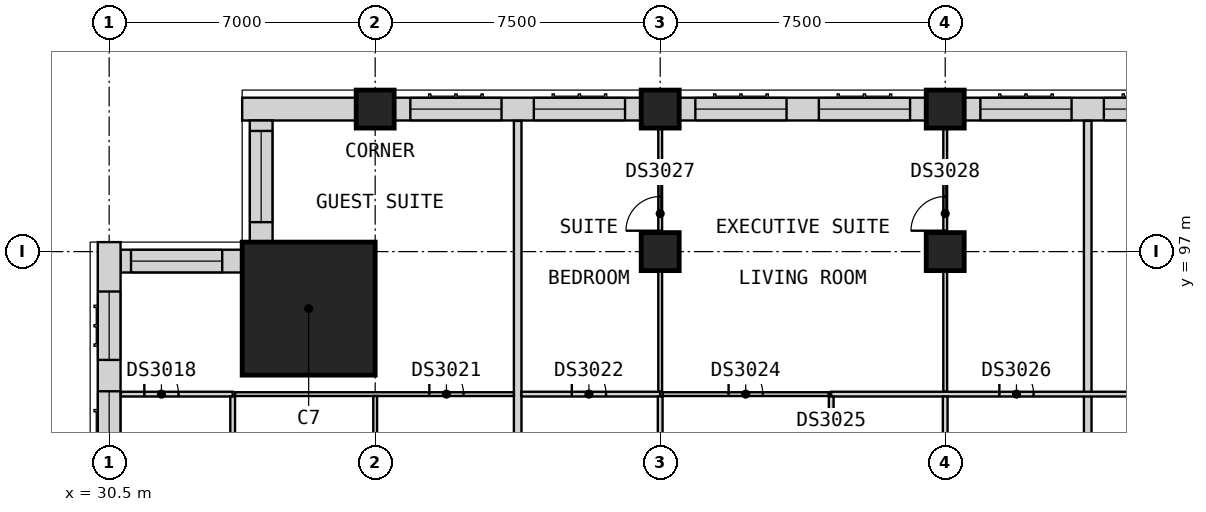
"""IFC4 building model, lengths in metres.
Left out: names, types, materials, properties, quantities, classifications, styles, units other than length and angle.
Written with IfcOpenShell. Run it as: python <this file> out.ifc"""

import sys

from ifc_helpers import new_model, si_unit, direction, frame, frame_2d, origin, origin_2d, place, context, subcontext, project, spatial, rectangle, extrude, element, fill, save


model = new_model("IFC4")
c1 = context("Model", 3, precision=1e-05, world=origin(), true_north=direction((0.0, 1.0)))
c2 = subcontext(c1, "Body", "Model", "MODEL_VIEW")
j1 = project(units=[si_unit("LENGTHUNIT", "METRE"), si_unit("PLANEANGLEUNIT", "RADIAN")], contexts=[c1])
p1 = place(None, origin())
s1 = spatial("IfcSite", under=j1, at=p1, CompositionType="ELEMENT")
p2 = place(p1, origin())
s2 = spatial("IfcBuilding", under=s1, at=p2, CompositionType="ELEMENT")
p3 = place(p2, frame((0.0, 0.0, 137.4)))
s3 = spatial("IfcBuildingStorey", under=s2, at=p3, CompositionType="ELEMENT", Elevation=137.4)
for number, where, z_axis, x_axis in (
    (1, (37.5, 100.75, 0.0), (0.0, 0.0, 1.0), (1.0, 0.0, 0.0)),
    (2, (45.0, 100.75, 0.0), (0.0, 0.0, 1.0), (1.0, 0.0, 0.0)),
    (3, (52.5, 100.75, 0.0), (0.0, 0.0, 1.0), (1.0, 0.0, 0.0)),
    (4, (45.0, 97.0, 0.0), (0.0, 0.0, 1.0), (1.0, 0.0, 0.0)),
    (5, (52.5, 97.0, 0.0), (0.0, 0.0, 1.0), (1.0, 0.0, 0.0)),
):
    element("IfcColumn", number, at=place(p3, frame(where, z_axis=z_axis, x_axis=x_axis)), inside=s3, PredefinedType="COLUMN", context=c2, shape_type="SweptSolid", body=[
        extrude(rectangle(XDim=1.0, YDim=1.0, at=origin_2d()), origin(), (0.0, 0.0, 1.0), 3.6),
    ])
p4 = place(p3, frame((35.75, 95.5, 0.0), z_axis=(0.0, 0.0, 1.0), x_axis=(1.0, 0.0, 0.0)))
e6 = element("IfcColumn", 6, at=p4, inside=s3, PredefinedType="COLUMN", context=c2, shape_type="SweptSolid", body=[
    extrude(rectangle(XDim=3.5, YDim=3.5, at=origin_2d()), origin(), (0.0, 0.0, 1.0), 3.6),
])
p5 = place(p3, frame((59.5, 100.75, 0.0), z_axis=(0.0, 0.0, 1.0), x_axis=(-1.0, 0.0, 0.0)))
e7 = element("IfcWall", 7, at=p5, inside=s3, PredefinedType="SOLIDWALL", context=c2, shape_type="SweptSolid", body=[
    extrude(rectangle(XDim=6.5, YDim=0.6, at=frame_2d((3.25, 0.0))), origin(), (0.0, 0.0, 1.0), 2.85),
])
p6 = place(p5, frame((3.675, 0.0, 0.8)))
e8 = element("IfcOpeningElement", 8, at=p6, cuts=e7, PredefinedType="OPENING", context=c2, shape_type="SweptSolid", body=[
    extrude(rectangle(XDim=2.4, YDim=1.8, at=frame_2d((1.2, 0.9))), frame((0.0, 0.31, 0.0), z_axis=(0.0, -1.0, 0.0), x_axis=(1.0, 0.0, 0.0)), (0.0, 0.0, 1.0), 0.62),
])
p7 = place(p5, frame((0.425, 0.0, 0.8)))
e9 = element("IfcOpeningElement", 9, at=p7, cuts=e7, PredefinedType="OPENING", context=c2, shape_type="SweptSolid", body=[
    extrude(rectangle(XDim=2.4, YDim=1.8, at=frame_2d((1.2, 0.9))), frame((0.0, 0.31, 0.0), z_axis=(0.0, -1.0, 0.0), x_axis=(1.0, 0.0, 0.0)), (0.0, 0.0, 1.0), 0.62),
])
p8 = place(p3, frame((52.0, 100.75, 0.0), z_axis=(0.0, 0.0, 1.0), x_axis=(-1.0, 0.0, 0.0)))
e10 = element("IfcWall", 10, at=p8, inside=s3, PredefinedType="SOLIDWALL", context=c2, shape_type="SweptSolid", body=[
    extrude(rectangle(XDim=6.5, YDim=0.6, at=frame_2d((3.25, 0.0))), origin(), (0.0, 0.0, 1.0), 2.85),
])
p9 = place(p8, frame((3.675, 0.0, 0.8)))
e11 = element("IfcOpeningElement", 11, at=p9, cuts=e10, PredefinedType="OPENING", context=c2, shape_type="SweptSolid", body=[
    extrude(rectangle(XDim=2.4, YDim=1.8, at=frame_2d((1.2, 0.9))), frame((0.0, 0.31, 0.0), z_axis=(0.0, -1.0, 0.0), x_axis=(1.0, 0.0, 0.0)), (0.0, 0.0, 1.0), 0.62),
])
p10 = place(p8, frame((0.425, 0.0, 0.8)))
e12 = element("IfcOpeningElement", 12, at=p10, cuts=e10, PredefinedType="OPENING", context=c2, shape_type="SweptSolid", body=[
    extrude(rectangle(XDim=2.4, YDim=1.8, at=frame_2d((1.2, 0.9))), frame((0.0, 0.31, 0.0), z_axis=(0.0, -1.0, 0.0), x_axis=(1.0, 0.0, 0.0)), (0.0, 0.0, 1.0), 0.62),
])
p11 = place(p3, frame((44.5, 100.75, 0.0), z_axis=(0.0, 0.0, 1.0), x_axis=(-1.0, 0.0, 0.0)))
e13 = element("IfcWall", 13, at=p11, inside=s3, PredefinedType="SOLIDWALL", context=c2, shape_type="SweptSolid", body=[
    extrude(rectangle(XDim=6.5, YDim=0.6, at=frame_2d((3.25, 0.0))), origin(), (0.0, 0.0, 1.0), 2.85),
])
p12 = place(p11, frame((3.675, 0.0, 0.8)))
e14 = element("IfcOpeningElement", 14, at=p12, cuts=e13, PredefinedType="OPENING", context=c2, shape_type="SweptSolid", body=[
    extrude(rectangle(XDim=2.4, YDim=1.8, at=frame_2d((1.2, 0.9))), frame((0.0, 0.31, 0.0), z_axis=(0.0, -1.0, 0.0), x_axis=(1.0, 0.0, 0.0)), (0.0, 0.0, 1.0), 0.62),
])
p13 = place(p11, frame((0.425, 0.0, 0.8)))
e15 = element("IfcOpeningElement", 15, at=p13, cuts=e13, PredefinedType="OPENING", context=c2, shape_type="SweptSolid", body=[
    extrude(rectangle(XDim=2.4, YDim=1.8, at=frame_2d((1.2, 0.9))), frame((0.0, 0.31, 0.0), z_axis=(0.0, -1.0, 0.0), x_axis=(1.0, 0.0, 0.0)), (0.0, 0.0, 1.0), 0.62),
])
p14 = place(p3, frame((37.0, 100.75, 0.0), z_axis=(0.0, 0.0, 1.0), x_axis=(-1.0, 0.0, 0.0)))
e16 = element("IfcWall", 16, at=p14, inside=s3, PredefinedType="SOLIDWALL", context=c2, shape_type="SweptSolid", body=[
    extrude(rectangle(XDim=3.0, YDim=0.6, at=frame_2d((1.5, 0.0))), origin(), (0.0, 0.0, 1.0), 3.35),
])
p15 = place(p3, frame((34.5, 100.45, 0.0), z_axis=(0.0, 0.0, 1.0), x_axis=(0.0, -1.0, 0.0)))
e17 = element("IfcWall", 17, at=p15, inside=s3, PredefinedType="SOLIDWALL", context=c2, shape_type="SweptSolid", body=[
    extrude(rectangle(XDim=3.2, YDim=0.6, at=frame_2d((1.6, 0.0))), origin(), (0.0, 0.0, 1.0), 3.35),
])
p16 = place(p15, frame((0.275, 0.0, 0.8)))
e18 = element("IfcOpeningElement", 18, at=p16, cuts=e17, PredefinedType="OPENING", context=c2, shape_type="SweptSolid", body=[
    extrude(rectangle(XDim=2.4, YDim=1.8, at=frame_2d((1.2, 0.9))), frame((0.0, 0.31, 0.0), z_axis=(0.0, -1.0, 0.0), x_axis=(1.0, 0.0, 0.0)), (0.0, 0.0, 1.0), 0.62),
])
p17 = place(p3, frame((34.0, 96.75, 0.0), z_axis=(0.0, 0.0, 1.0), x_axis=(-1.0, 0.0, 0.0)))
e19 = element("IfcWall", 19, at=p17, inside=s3, PredefinedType="SOLIDWALL", context=c2, shape_type="SweptSolid", body=[
    extrude(rectangle(XDim=3.2, YDim=0.6, at=frame_2d((1.6, 0.0))), origin(), (0.0, 0.0, 1.0), 3.35),
])
p18 = place(p17, frame((0.525, 0.0, 0.8)))
e20 = element("IfcOpeningElement", 20, at=p18, cuts=e19, PredefinedType="OPENING", context=c2, shape_type="SweptSolid", body=[
    extrude(rectangle(XDim=2.4, YDim=1.8, at=frame_2d((1.2, 0.9))), frame((0.0, 0.31, 0.0), z_axis=(0.0, -1.0, 0.0), x_axis=(1.0, 0.0, 0.0)), (0.0, 0.0, 1.0), 0.62),
])
p19 = place(p3, frame((30.5, 97.25, 0.0), z_axis=(0.0, 0.0, 1.0), x_axis=(0.0, -1.0, 0.0)))
e21 = element("IfcWall", 21, at=p19, inside=s3, PredefinedType="SOLIDWALL", context=c2, shape_type="SweptSolid", body=[
    extrude(rectangle(XDim=6.75, YDim=0.6, at=frame_2d((3.375, 0.0))), origin(), (0.0, 0.0, 1.0), 2.85),
])
p20 = place(p19, frame((3.925, 0.0, 0.8)))
e22 = element("IfcOpeningElement", 22, at=p20, cuts=e21, PredefinedType="OPENING", context=c2, shape_type="SweptSolid", body=[
    extrude(rectangle(XDim=2.4, YDim=1.8, at=frame_2d((1.2, 0.9))), frame((0.0, 0.31, 0.0), z_axis=(0.0, -1.0, 0.0), x_axis=(1.0, 0.0, 0.0)), (0.0, 0.0, 1.0), 0.62),
])
p21 = place(p19, frame((1.3, 0.0, 0.8)))
e23 = element("IfcOpeningElement", 23, at=p21, cuts=e21, PredefinedType="OPENING", context=c2, shape_type="SweptSolid", body=[
    extrude(rectangle(XDim=1.8, YDim=1.8, at=frame_2d((0.9, 0.9))), frame((0.0, 0.31, 0.0), z_axis=(0.0, -1.0, 0.0), x_axis=(1.0, 0.0, 0.0)), (0.0, 0.0, 1.0), 0.62),
])
for number, where, z_axis, x_axis in (
    (24, (41.25, 88.725, 0.0), (0.0, 0.0, 1.0), (0.0, 1.0, 0.0)),
    (25, (56.25, 88.725, 0.0), (0.0, 0.0, 1.0), (0.0, 1.0, 0.0)),
):
    element("IfcWall", number, at=place(p3, frame(where, z_axis=z_axis, x_axis=x_axis)), inside=s3, PredefinedType="PARTITIONING", context=c2, shape_type="SweptSolid", body=[
        extrude(rectangle(XDim=11.715, YDim=0.2, at=frame_2d((5.857, 0.0))), origin(), (0.0, 0.0, 1.0), 3.35),
    ])
p22 = place(p3, frame((33.812, 93.25, 0.0), z_axis=(0.0, 0.0, 1.0), x_axis=(1.0, 0.0, 0.0)))
e26 = element("IfcWall", 26, at=p22, inside=s3, PredefinedType="PARTITIONING", context=c2, shape_type="SweptSolid", body=[
    extrude(rectangle(XDim=7.337, YDim=0.1, at=frame_2d((3.669, 0.0))), origin(), (0.0, 0.0, 1.0), 3.35),
])
p23 = place(p22, frame((5.113, 0.0, 0.0)))
e27 = element("IfcOpeningElement", 27, at=p23, cuts=e26, PredefinedType="OPENING", context=c2, shape_type="SweptSolid", body=[
    extrude(rectangle(XDim=0.9, YDim=2.1, at=frame_2d((0.45, 1.05))), frame((0.0, 0.06, 0.0), z_axis=(0.0, -1.0, 0.0), x_axis=(1.0, 0.0, 0.0)), (0.0, 0.0, 1.0), 0.12),
])
p24 = place(p3, frame((45.062, 93.25, 0.0), z_axis=(0.0, 0.0, 1.0), x_axis=(1.0, 0.0, 0.0)))
e28 = element("IfcWall", 28, at=p24, inside=s3, PredefinedType="PARTITIONING", context=c2, shape_type="SweptSolid", body=[
    extrude(rectangle(XDim=4.375, YDim=0.1, at=frame_2d((2.188, 0.0))), origin(), (0.0, 0.0, 1.0), 3.35),
])
p25 = place(p24, frame((1.738, 0.0, 0.0)))
e29 = element("IfcOpeningElement", 29, at=p25, cuts=e28, PredefinedType="OPENING", context=c2, shape_type="SweptSolid", body=[
    extrude(rectangle(XDim=0.9, YDim=2.1, at=frame_2d((0.45, 1.05))), frame((0.0, 0.06, 0.0), z_axis=(0.0, -1.0, 0.0), x_axis=(1.0, 0.0, 0.0)), (0.0, 0.0, 1.0), 0.12),
])
p26 = place(p3, frame((37.5, 88.725, 0.0), z_axis=(0.0, 0.0, 1.0), x_axis=(0.0, 1.0, 0.0)))
e30 = element("IfcWall", 30, at=p26, inside=s3, PredefinedType="PARTITIONING", context=c2, shape_type="SweptSolid", body=[
    extrude(rectangle(XDim=4.475, YDim=0.1, at=frame_2d((2.237, 0.0))), origin(), (0.0, 0.0, 1.0), 3.35),
])
p27 = place(p26, frame((1.825, 0.0, 0.0)))
e31 = element("IfcOpeningElement", 31, at=p27, cuts=e30, PredefinedType="OPENING", context=c2, shape_type="SweptSolid", body=[
    extrude(rectangle(XDim=0.9, YDim=2.1, at=frame_2d((0.45, 1.05))), frame((0.0, 0.06, 0.0), z_axis=(0.0, -1.0, 0.0), x_axis=(1.0, 0.0, 0.0)), (0.0, 0.0, 1.0), 0.12),
])
p28 = place(p3, frame((45.0, 93.312, 0.0), z_axis=(0.0, 0.0, 1.0), x_axis=(0.0, 1.0, 0.0)))
e32 = element("IfcWall", 32, at=p28, inside=s3, PredefinedType="PARTITIONING", context=c2, shape_type="SweptSolid", body=[
    extrude(rectangle(XDim=7.938, YDim=0.1, at=frame_2d((3.969, 0.0))), origin(), (0.0, 0.0, 1.0), 3.35),
])
p29 = place(p28, frame((4.238, 0.0, 0.0)))
e33 = element("IfcOpeningElement", 33, at=p29, cuts=e32, PredefinedType="OPENING", context=c2, shape_type="SweptSolid", body=[
    extrude(rectangle(XDim=0.9, YDim=2.1, at=frame_2d((0.45, 1.05))), frame((0.0, 0.06, 0.0), z_axis=(0.0, -1.0, 0.0), x_axis=(1.0, 0.0, 0.0)), (0.0, 0.0, 1.0), 0.12),
])
p30 = place(p3, frame((52.5, 93.312, 0.0), z_axis=(0.0, 0.0, 1.0), x_axis=(0.0, 1.0, 0.0)))
e34 = element("IfcWall", 34, at=p30, inside=s3, PredefinedType="PARTITIONING", context=c2, shape_type="SweptSolid", body=[
    extrude(rectangle(XDim=7.938, YDim=0.1, at=frame_2d((3.969, 0.0))), origin(), (0.0, 0.0, 1.0), 3.35),
])
p31 = place(p30, frame((4.238, 0.0, 0.0)))
e35 = element("IfcOpeningElement", 35, at=p31, cuts=e34, PredefinedType="OPENING", context=c2, shape_type="SweptSolid", body=[
    extrude(rectangle(XDim=0.9, YDim=2.1, at=frame_2d((0.45, 1.05))), frame((0.0, 0.06, 0.0), z_axis=(0.0, -1.0, 0.0), x_axis=(1.0, 0.0, 0.0)), (0.0, 0.0, 1.0), 0.12),
])
p32 = place(p3, frame((30.81, 93.25, 0.0), z_axis=(0.0, 0.0, 1.0), x_axis=(1.0, 0.0, 0.0)))
e36 = element("IfcWall", 36, at=p32, inside=s3, PredefinedType="PARTITIONING", context=c2, shape_type="SweptSolid", body=[
    extrude(rectangle(XDim=2.94, YDim=0.125, at=frame_2d((1.47, 0.0))), origin(), (0.0, 0.0, 1.0), 3.35),
])
p33 = place(p32, frame((0.615, 0.0, 0.0)))
e37 = element("IfcOpeningElement", 37, at=p33, cuts=e36, PredefinedType="OPENING", context=c2, shape_type="SweptSolid", body=[
    extrude(rectangle(XDim=0.9, YDim=2.1, at=frame_2d((0.45, 1.05))), frame((0.0, 0.073, 0.0), z_axis=(0.0, -1.0, 0.0), x_axis=(1.0, 0.0, 0.0)), (0.0, 0.0, 1.0), 0.145),
])
p34 = place(p3, frame((41.35, 93.25, 0.0), z_axis=(0.0, 0.0, 1.0), x_axis=(1.0, 0.0, 0.0)))
e38 = element("IfcWall", 38, at=p34, inside=s3, PredefinedType="PARTITIONING", context=c2, shape_type="SweptSolid", body=[
    extrude(rectangle(XDim=3.65, YDim=0.125, at=frame_2d((1.825, 0.0))), origin(), (0.0, 0.0, 1.0), 3.35),
])
p35 = place(p34, frame((1.325, 0.0, 0.0)))
e39 = element("IfcOpeningElement", 39, at=p35, cuts=e38, PredefinedType="OPENING", context=c2, shape_type="SweptSolid", body=[
    extrude(rectangle(XDim=0.9, YDim=2.1, at=frame_2d((0.45, 1.05))), frame((0.0, 0.073, 0.0), z_axis=(0.0, -1.0, 0.0), x_axis=(1.0, 0.0, 0.0)), (0.0, 0.0, 1.0), 0.145),
])
p36 = place(p3, frame((49.5, 93.25, 0.0), z_axis=(0.0, 0.0, 1.0), x_axis=(1.0, 0.0, 0.0)))
e40 = element("IfcWall", 40, at=p36, inside=s3, PredefinedType="PARTITIONING", context=c2, shape_type="SweptSolid", body=[
    extrude(rectangle(XDim=11.25, YDim=0.125, at=frame_2d((5.625, 0.0))), origin(), (0.0, 0.0, 1.0), 3.35),
])
p37 = place(p36, frame((4.425, 0.0, 0.0)))
e41 = element("IfcOpeningElement", 41, at=p37, cuts=e40, PredefinedType="OPENING", context=c2, shape_type="SweptSolid", body=[
    extrude(rectangle(XDim=0.9, YDim=2.1, at=frame_2d((0.45, 1.05))), frame((0.0, 0.073, 0.0), z_axis=(0.0, -1.0, 0.0), x_axis=(1.0, 0.0, 0.0)), (0.0, 0.0, 1.0), 0.145),
])
p38 = place(p36, frame((8.55, 0.0, 0.0)))
e42 = element("IfcOpeningElement", 42, at=p38, cuts=e40, PredefinedType="OPENING", context=c2, shape_type="SweptSolid", body=[
    extrude(rectangle(XDim=0.9, YDim=2.1, at=frame_2d((0.45, 1.05))), frame((0.0, 0.073, 0.0), z_axis=(0.0, -1.0, 0.0), x_axis=(1.0, 0.0, 0.0)), (0.0, 0.0, 1.0), 0.145),
])
for number, where, z_axis, x_axis in (
    (43, (33.75, 88.725, 0.0), (0.0, 0.0, 1.0), (0.0, 1.0, 0.0)),
    (44, (45.0, 88.725, 0.0), (0.0, 0.0, 1.0), (0.0, 1.0, 0.0)),
):
    element("IfcWall", number, at=place(p3, frame(where, z_axis=z_axis, x_axis=x_axis)), inside=s3, PredefinedType="PARTITIONING", context=c2, shape_type="SweptSolid", body=[
        extrude(rectangle(XDim=4.462, YDim=0.125, at=frame_2d((2.231, 0.0))), origin(), (0.0, 0.0, 1.0), 3.35),
    ])
p39 = place(p3, frame((49.5, 88.725, 0.0), z_axis=(0.0, 0.0, 1.0), x_axis=(0.0, 1.0, 0.0)))
e45 = element("IfcWall", 45, at=p39, inside=s3, PredefinedType="PARTITIONING", context=c2, shape_type="SweptSolid", body=[
    extrude(rectangle(XDim=4.462, YDim=0.125, at=frame_2d((2.231, 0.0))), origin(), (0.0, 0.0, 1.0), 3.35),
])
p40 = place(p39, frame((1.775, 0.0, 0.0)))
e46 = element("IfcOpeningElement", 46, at=p40, cuts=e45, PredefinedType="OPENING", context=c2, shape_type="SweptSolid", body=[
    extrude(rectangle(XDim=0.9, YDim=2.1, at=frame_2d((0.45, 1.05))), frame((0.0, 0.073, 0.0), z_axis=(0.0, -1.0, 0.0), x_axis=(1.0, 0.0, 0.0)), (0.0, 0.0, 1.0), 0.145),
])
p41 = place(p3, frame((52.5, 88.725, 0.0), z_axis=(0.0, 0.0, 1.0), x_axis=(0.0, 1.0, 0.0)))
e47 = element("IfcWall", 47, at=p41, inside=s3, PredefinedType="PARTITIONING", context=c2, shape_type="SweptSolid", body=[
    extrude(rectangle(XDim=4.462, YDim=0.125, at=frame_2d((2.231, 0.0))), origin(), (0.0, 0.0, 1.0), 3.35),
])
p42 = place(p6, origin())
e48 = element("IfcWindow", 48, at=p42, inside=s3, PartitioningType="SINGLE_PANEL", PredefinedType="WINDOW", context=c2, shape_type="SweptSolid", body=[
    extrude(rectangle(XDim=2.4, YDim=1.8, at=frame_2d((1.2, 0.9))), frame((0.0, -0.07, 0.0), z_axis=(0.0, -1.0, 0.0), x_axis=(1.0, 0.0, 0.0)), (0.0, 0.0, 1.0), 0.06),
])
fill(e8, e48)
p43 = place(p7, origin())
e49 = element("IfcWindow", 49, at=p43, inside=s3, PartitioningType="SINGLE_PANEL", PredefinedType="WINDOW", context=c2, shape_type="SweptSolid", body=[
    extrude(rectangle(XDim=2.4, YDim=1.8, at=frame_2d((1.2, 0.9))), frame((0.0, -0.07, 0.0), z_axis=(0.0, -1.0, 0.0), x_axis=(1.0, 0.0, 0.0)), (0.0, 0.0, 1.0), 0.06),
])
fill(e9, e49)
p44 = place(p9, origin())
e50 = element("IfcWindow", 50, at=p44, inside=s3, PartitioningType="SINGLE_PANEL", PredefinedType="WINDOW", context=c2, shape_type="SweptSolid", body=[
    extrude(rectangle(XDim=2.4, YDim=1.8, at=frame_2d((1.2, 0.9))), frame((0.0, -0.07, 0.0), z_axis=(0.0, -1.0, 0.0), x_axis=(1.0, 0.0, 0.0)), (0.0, 0.0, 1.0), 0.06),
])
fill(e11, e50)
p45 = place(p10, origin())
e51 = element("IfcWindow", 51, at=p45, inside=s3, PartitioningType="SINGLE_PANEL", PredefinedType="WINDOW", context=c2, shape_type="SweptSolid", body=[
    extrude(rectangle(XDim=2.4, YDim=1.8, at=frame_2d((1.2, 0.9))), frame((0.0, -0.07, 0.0), z_axis=(0.0, -1.0, 0.0), x_axis=(1.0, 0.0, 0.0)), (0.0, 0.0, 1.0), 0.06),
])
fill(e12, e51)
p46 = place(p12, origin())
e52 = element("IfcWindow", 52, at=p46, inside=s3, PartitioningType="SINGLE_PANEL", PredefinedType="WINDOW", context=c2, shape_type="SweptSolid", body=[
    extrude(rectangle(XDim=2.4, YDim=1.8, at=frame_2d((1.2, 0.9))), frame((0.0, -0.07, 0.0), z_axis=(0.0, -1.0, 0.0), x_axis=(1.0, 0.0, 0.0)), (0.0, 0.0, 1.0), 0.06),
])
fill(e14, e52)
p47 = place(p13, origin())
e53 = element("IfcWindow", 53, at=p47, inside=s3, PartitioningType="SINGLE_PANEL", PredefinedType="WINDOW", context=c2, shape_type="SweptSolid", body=[
    extrude(rectangle(XDim=2.4, YDim=1.8, at=frame_2d((1.2, 0.9))), frame((0.0, -0.07, 0.0), z_axis=(0.0, -1.0, 0.0), x_axis=(1.0, 0.0, 0.0)), (0.0, 0.0, 1.0), 0.06),
])
fill(e15, e53)
p48 = place(p16, origin())
e54 = element("IfcWindow", 54, at=p48, inside=s3, PartitioningType="SINGLE_PANEL", PredefinedType="WINDOW", context=c2, shape_type="SweptSolid", body=[
    extrude(rectangle(XDim=2.4, YDim=1.8, at=frame_2d((1.2, 0.9))), frame((0.0, -0.07, 0.0), z_axis=(0.0, -1.0, 0.0), x_axis=(1.0, 0.0, 0.0)), (0.0, 0.0, 1.0), 0.06),
])
fill(e18, e54)
p49 = place(p18, origin())
e55 = element("IfcWindow", 55, at=p49, inside=s3, PartitioningType="SINGLE_PANEL", PredefinedType="WINDOW", context=c2, shape_type="SweptSolid", body=[
    extrude(rectangle(XDim=2.4, YDim=1.8, at=frame_2d((1.2, 0.9))), frame((0.0, -0.07, 0.0), z_axis=(0.0, -1.0, 0.0), x_axis=(1.0, 0.0, 0.0)), (0.0, 0.0, 1.0), 0.06),
])
fill(e20, e55)
p50 = place(p20, origin())
e56 = element("IfcWindow", 56, at=p50, inside=s3, PartitioningType="SINGLE_PANEL", PredefinedType="WINDOW", context=c2, shape_type="SweptSolid", body=[
    extrude(rectangle(XDim=2.4, YDim=1.8, at=frame_2d((1.2, 0.9))), frame((0.0, -0.07, 0.0), z_axis=(0.0, -1.0, 0.0), x_axis=(1.0, 0.0, 0.0)), (0.0, 0.0, 1.0), 0.06),
])
fill(e22, e56)
p51 = place(p21, origin())
e57 = element("IfcWindow", 57, at=p51, inside=s3, PartitioningType="SINGLE_PANEL", PredefinedType="WINDOW", context=c2, shape_type="SweptSolid", body=[
    extrude(rectangle(XDim=1.8, YDim=1.8, at=frame_2d((0.9, 0.9))), frame((0.0, -0.07, 0.0), z_axis=(0.0, -1.0, 0.0), x_axis=(1.0, 0.0, 0.0)), (0.0, 0.0, 1.0), 0.06),
])
fill(e23, e57)
p52 = place(p33, origin())
e58 = element("IfcDoor", 58, at=p52, inside=s3, OperationType="SINGLE_SWING_RIGHT", PredefinedType="DOOR", context=c2, shape_type="SweptSolid", body=[
    extrude(rectangle(XDim=0.9, YDim=2.1, at=frame_2d((0.45, 1.05))), frame((0.0, 0.025, 0.0), z_axis=(0.0, -1.0, 0.0), x_axis=(1.0, 0.0, 0.0)), (0.0, 0.0, 1.0), 0.05),
])
fill(e37, e58)
p53 = place(p23, origin())
e59 = element("IfcDoor", 59, at=p53, inside=s3, OperationType="SINGLE_SWING_RIGHT", PredefinedType="DOOR", context=c2, shape_type="SweptSolid", body=[
    extrude(rectangle(XDim=0.9, YDim=2.1, at=frame_2d((0.45, 1.05))), frame((0.0, 0.025, 0.0), z_axis=(0.0, -1.0, 0.0), x_axis=(1.0, 0.0, 0.0)), (0.0, 0.0, 1.0), 0.05),
])
fill(e27, e59)
p54 = place(p35, origin())
e60 = element("IfcDoor", 60, at=p54, inside=s3, OperationType="SINGLE_SWING_RIGHT", PredefinedType="DOOR", context=c2, shape_type="SweptSolid", body=[
    extrude(rectangle(XDim=0.9, YDim=2.1, at=frame_2d((0.45, 1.05))), frame((0.0, 0.025, 0.0), z_axis=(0.0, -1.0, 0.0), x_axis=(1.0, 0.0, 0.0)), (0.0, 0.0, 1.0), 0.05),
])
fill(e39, e60)
p55 = place(p25, origin())
e61 = element("IfcDoor", 61, at=p55, inside=s3, OperationType="SINGLE_SWING_RIGHT", PredefinedType="DOOR", context=c2, shape_type="SweptSolid", body=[
    extrude(rectangle(XDim=0.9, YDim=2.1, at=frame_2d((0.45, 1.05))), frame((0.0, 0.025, 0.0), z_axis=(0.0, -1.0, 0.0), x_axis=(1.0, 0.0, 0.0)), (0.0, 0.0, 1.0), 0.05),
])
fill(e29, e61)
p56 = place(p37, origin())
e62 = element("IfcDoor", 62, at=p56, inside=s3, OperationType="SINGLE_SWING_RIGHT", PredefinedType="DOOR", context=c2, shape_type="SweptSolid", body=[
    extrude(rectangle(XDim=0.9, YDim=2.1, at=frame_2d((0.45, 1.05))), frame((0.0, 0.025, 0.0), z_axis=(0.0, -1.0, 0.0), x_axis=(1.0, 0.0, 0.0)), (0.0, 0.0, 1.0), 0.05),
])
fill(e41, e62)
p57 = place(p29, origin())
e63 = element("IfcDoor", 63, at=p57, inside=s3, OperationType="SINGLE_SWING_RIGHT", PredefinedType="DOOR", context=c2, shape_type="SweptSolid", body=[
    extrude(rectangle(XDim=0.9, YDim=2.1, at=frame_2d((0.45, 1.05))), frame((0.0, 0.025, 0.0), z_axis=(0.0, -1.0, 0.0), x_axis=(1.0, 0.0, 0.0)), (0.0, 0.0, 1.0), 0.05),
])
fill(e33, e63)
p58 = place(p31, origin())
e64 = element("IfcDoor", 64, at=p58, inside=s3, OperationType="SINGLE_SWING_RIGHT", PredefinedType="DOOR", context=c2, shape_type="SweptSolid", body=[
    extrude(rectangle(XDim=0.9, YDim=2.1, at=frame_2d((0.45, 1.05))), frame((0.0, 0.025, 0.0), z_axis=(0.0, -1.0, 0.0), x_axis=(1.0, 0.0, 0.0)), (0.0, 0.0, 1.0), 0.05),
])
fill(e35, e64)
save(model, sys.argv[1])
